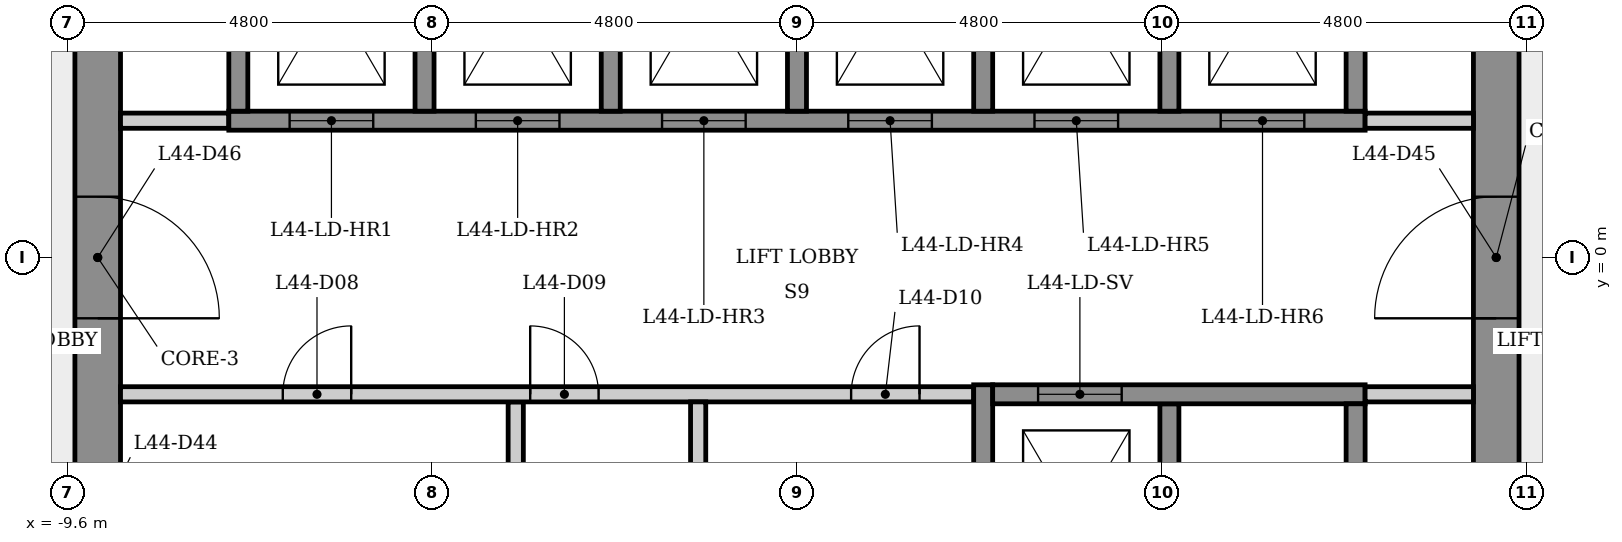
"""IFC4 building model, lengths in metres.
Left out: names, types, materials, properties, quantities, classifications, styles, units other than length and angle.
Written with IfcOpenShell. Run it as: python <this file> out.ifc"""

import sys

from ifc_helpers import new_model, si_unit, direction, frame, frame_2d, origin, place, context, subcontext, project, spatial, rectangle, extrude, element, fill, save


model = new_model("IFC4")
c1 = context("Model", 3, precision=1e-05, world=origin(), true_north=direction((0.0, 1.0)))
c2 = subcontext(c1, "Body", "Model", "MODEL_VIEW")
j1 = project(units=[si_unit("LENGTHUNIT", "METRE"), si_unit("PLANEANGLEUNIT", "RADIAN")], contexts=[c1])
p1 = place(None, origin())
s1 = spatial("IfcSite", under=j1, at=p1, CompositionType="ELEMENT")
p2 = place(p1, origin())
s2 = spatial("IfcBuilding", under=s1, at=p2, CompositionType="ELEMENT")
p3 = place(p2, frame((0.0, 0.0, 166.3)))
s3 = spatial("IfcBuildingStorey", under=s2, at=p3, CompositionType="ELEMENT", Elevation=166.3)
p4 = place(p3, frame((9.2, -5.485, 0.0), z_axis=(0.0, 0.0, 1.0), x_axis=(0.0, 1.0, 0.0)))
e1 = element("IfcWall", 1, at=p4, inside=s3, PredefinedType="SHEAR", context=c2, shape_type="SweptSolid", body=[
    extrude(rectangle(XDim=10.97, YDim=0.6, at=frame_2d((5.485, 0.0))), origin(), (0.0, 0.0, 1.0), 3.4),
])
p5 = place(p4, frame((4.685, 0.0, 0.0)))
e2 = element("IfcOpeningElement", 2, at=p5, cuts=e1, PredefinedType="OPENING", context=c2, shape_type="SweptSolid", body=[
    extrude(rectangle(XDim=1.6, YDim=2.1, at=frame_2d((0.8, 1.05))), frame((0.0, 0.31, 0.0), z_axis=(0.0, -1.0, 0.0), x_axis=(1.0, 0.0, 0.0)), (0.0, 0.0, 1.0), 0.62),
])
p6 = place(p3, frame((-9.2, 5.485, 0.0), z_axis=(0.0, 0.0, 1.0), x_axis=(0.0, -1.0, 0.0)))
e3 = element("IfcWall", 3, at=p6, inside=s3, PredefinedType="SHEAR", context=c2, shape_type="SweptSolid", body=[
    extrude(rectangle(XDim=10.97, YDim=0.6, at=frame_2d((5.485, 0.0))), origin(), (0.0, 0.0, 1.0), 3.4),
])
p7 = place(p6, frame((8.516, 0.0, 0.0)))
e4 = element("IfcOpeningElement", 4, at=p7, cuts=e3, PredefinedType="OPENING", context=c2, shape_type="SweptSolid", body=[
    extrude(rectangle(XDim=0.9, YDim=2.1, at=frame_2d((0.45, 1.05))), frame((0.0, 0.31, 0.0), z_axis=(0.0, -1.0, 0.0), x_axis=(1.0, 0.0, 0.0)), (0.0, 0.0, 1.0), 0.62),
])
p8 = place(p6, frame((4.685, 0.0, 0.0)))
e5 = element("IfcOpeningElement", 5, at=p8, cuts=e3, PredefinedType="OPENING", context=c2, shape_type="SweptSolid", body=[
    extrude(rectangle(XDim=1.6, YDim=2.1, at=frame_2d((0.8, 1.05))), frame((0.0, 0.31, 0.0), z_axis=(0.0, -1.0, 0.0), x_axis=(1.0, 0.0, 0.0)), (0.0, 0.0, 1.0), 0.62),
])
p9 = place(p3, frame((-8.9, 1.8, 0.0), z_axis=(0.0, 0.0, 1.0), x_axis=(1.0, 0.0, 0.0)))
e6 = element("IfcWall", 6, at=p9, inside=s3, PredefinedType="PARTITIONING", context=c2, shape_type="SweptSolid", body=[
    extrude(rectangle(XDim=1.425, YDim=0.2, at=frame_2d((0.712, 0.0))), origin(), (0.0, 0.0, 1.0), 3.05),
])
p10 = place(p3, frame((-7.475, 1.8, 0.0), z_axis=(0.0, 0.0, 1.0), x_axis=(1.0, 0.0, 0.0)))
e7 = element("IfcWall", 7, at=p10, inside=s3, PredefinedType="SHEAR", context=c2, shape_type="SweptSolid", body=[
    extrude(rectangle(XDim=14.95, YDim=0.25, at=frame_2d((7.475, 0.0))), origin(), (0.0, 0.0, 1.0), 3.05),
])
p11 = place(p10, frame((0.8, 0.0, 0.0)))
e8 = element("IfcOpeningElement", 8, at=p11, cuts=e7, PredefinedType="OPENING", context=c2, shape_type="SweptSolid", body=[
    extrude(rectangle(XDim=1.1, YDim=2.1, at=frame_2d((0.55, 1.05))), frame((0.0, 0.135, 0.0), z_axis=(0.0, -1.0, 0.0), x_axis=(1.0, 0.0, 0.0)), (0.0, 0.0, 1.0), 0.27),
])
p12 = place(p10, frame((3.25, 0.0, 0.0)))
e9 = element("IfcOpeningElement", 9, at=p12, cuts=e7, PredefinedType="OPENING", context=c2, shape_type="SweptSolid", body=[
    extrude(rectangle(XDim=1.1, YDim=2.1, at=frame_2d((0.55, 1.05))), frame((0.0, 0.135, 0.0), z_axis=(0.0, -1.0, 0.0), x_axis=(1.0, 0.0, 0.0)), (0.0, 0.0, 1.0), 0.27),
])
p13 = place(p10, frame((5.7, 0.0, 0.0)))
e10 = element("IfcOpeningElement", 10, at=p13, cuts=e7, PredefinedType="OPENING", context=c2, shape_type="SweptSolid", body=[
    extrude(rectangle(XDim=1.1, YDim=2.1, at=frame_2d((0.55, 1.05))), frame((0.0, 0.135, 0.0), z_axis=(0.0, -1.0, 0.0), x_axis=(1.0, 0.0, 0.0)), (0.0, 0.0, 1.0), 0.27),
])
p14 = place(p10, frame((8.15, 0.0, 0.0)))
e11 = element("IfcOpeningElement", 11, at=p14, cuts=e7, PredefinedType="OPENING", context=c2, shape_type="SweptSolid", body=[
    extrude(rectangle(XDim=1.1, YDim=2.1, at=frame_2d((0.55, 1.05))), frame((0.0, 0.135, 0.0), z_axis=(0.0, -1.0, 0.0), x_axis=(1.0, 0.0, 0.0)), (0.0, 0.0, 1.0), 0.27),
])
p15 = place(p10, frame((10.6, 0.0, 0.0)))
e12 = element("IfcOpeningElement", 12, at=p15, cuts=e7, PredefinedType="OPENING", context=c2, shape_type="SweptSolid", body=[
    extrude(rectangle(XDim=1.1, YDim=2.1, at=frame_2d((0.55, 1.05))), frame((0.0, 0.135, 0.0), z_axis=(0.0, -1.0, 0.0), x_axis=(1.0, 0.0, 0.0)), (0.0, 0.0, 1.0), 0.27),
])
p16 = place(p10, frame((13.05, 0.0, 0.0)))
e13 = element("IfcOpeningElement", 13, at=p16, cuts=e7, PredefinedType="OPENING", context=c2, shape_type="SweptSolid", body=[
    extrude(rectangle(XDim=1.1, YDim=2.1, at=frame_2d((0.55, 1.05))), frame((0.0, 0.135, 0.0), z_axis=(0.0, -1.0, 0.0), x_axis=(1.0, 0.0, 0.0)), (0.0, 0.0, 1.0), 0.27),
])
p17 = place(p3, frame((-7.35, 1.925, 0.0), z_axis=(0.0, 0.0, 1.0), x_axis=(0.0, 1.0, 0.0)))
e14 = element("IfcWall", 14, at=p17, inside=s3, PredefinedType="SHEAR", context=c2, shape_type="SweptSolid", body=[
    extrude(rectangle(XDim=4.036, YDim=0.25, at=frame_2d((2.018, 0.0))), origin(), (0.0, 0.0, 1.0), 3.05),
])
p18 = place(p3, frame((-4.9, 5.025, 0.0), z_axis=(0.0, 0.0, 1.0), x_axis=(0.0, -1.0, 0.0)))
e15 = element("IfcWall", 15, at=p18, inside=s3, PredefinedType="SHEAR", context=c2, shape_type="SweptSolid", body=[
    extrude(rectangle(XDim=3.1, YDim=0.25, at=frame_2d((1.55, 0.0))), origin(), (0.0, 0.0, 1.0), 3.4),
])
p19 = place(p3, frame((-3.7, -1.9, 0.0), z_axis=(0.0, 0.0, 1.0), x_axis=(0.0, -1.0, 0.0)))
e16 = element("IfcWall", 16, at=p19, inside=s3, PredefinedType="PARTITIONING", context=c2, shape_type="SweptSolid", body=[
    extrude(rectangle(XDim=3.15, YDim=0.2, at=frame_2d((1.575, 0.0))), origin(), (0.0, 0.0, 1.0), 3.05),
])
p20 = place(p3, frame((-8.9, -1.8, 0.0), z_axis=(0.0, 0.0, 1.0), x_axis=(1.0, 0.0, 0.0)))
e17 = element("IfcWall", 17, at=p20, inside=s3, PredefinedType="PARTITIONING", context=c2, shape_type="SweptSolid", body=[
    extrude(rectangle(XDim=11.225, YDim=0.2, at=frame_2d((5.613, 0.0))), origin(), (0.0, 0.0, 1.0), 3.05),
])
p21 = place(p20, frame((2.135, 0.0, 0.0)))
e18 = element("IfcOpeningElement", 18, at=p21, cuts=e17, PredefinedType="OPENING", context=c2, shape_type="SweptSolid", body=[
    extrude(rectangle(XDim=0.9, YDim=2.1, at=frame_2d((0.45, 1.05))), frame((0.0, 0.11, 0.0), z_axis=(0.0, -1.0, 0.0), x_axis=(1.0, 0.0, 0.0)), (0.0, 0.0, 1.0), 0.22),
])
p22 = place(p20, frame((5.39, 0.0, 0.0)))
e19 = element("IfcOpeningElement", 19, at=p22, cuts=e17, PredefinedType="OPENING", context=c2, shape_type="SweptSolid", body=[
    extrude(rectangle(XDim=0.9, YDim=2.1, at=frame_2d((0.45, 1.05))), frame((0.0, 0.11, 0.0), z_axis=(0.0, -1.0, 0.0), x_axis=(1.0, 0.0, 0.0)), (0.0, 0.0, 1.0), 0.22),
])
p23 = place(p20, frame((9.613, 0.0, 0.0)))
e20 = element("IfcOpeningElement", 20, at=p23, cuts=e17, PredefinedType="OPENING", context=c2, shape_type="SweptSolid", body=[
    extrude(rectangle(XDim=0.9, YDim=2.1, at=frame_2d((0.45, 1.05))), frame((0.0, 0.11, 0.0), z_axis=(0.0, -1.0, 0.0), x_axis=(1.0, 0.0, 0.0)), (0.0, 0.0, 1.0), 0.22),
])
p24 = place(p3, frame((-2.45, 5.025, 0.0), z_axis=(0.0, 0.0, 1.0), x_axis=(0.0, -1.0, 0.0)))
e21 = element("IfcWall", 21, at=p24, inside=s3, PredefinedType="SHEAR", context=c2, shape_type="SweptSolid", body=[
    extrude(rectangle(XDim=3.1, YDim=0.25, at=frame_2d((1.55, 0.0))), origin(), (0.0, 0.0, 1.0), 3.4),
])
p25 = place(p3, frame((-1.3, -1.9, 0.0), z_axis=(0.0, 0.0, 1.0), x_axis=(0.0, -1.0, 0.0)))
e22 = element("IfcWall", 22, at=p25, inside=s3, PredefinedType="PARTITIONING", context=c2, shape_type="SweptSolid", body=[
    extrude(rectangle(XDim=3.15, YDim=0.2, at=frame_2d((1.575, 0.0))), origin(), (0.0, 0.0, 1.0), 3.05),
])
p26 = place(p3, frame((0.0, 5.025, 0.0), z_axis=(0.0, 0.0, 1.0), x_axis=(0.0, -1.0, 0.0)))
e23 = element("IfcWall", 23, at=p26, inside=s3, PredefinedType="SHEAR", context=c2, shape_type="SweptSolid", body=[
    extrude(rectangle(XDim=3.1, YDim=0.25, at=frame_2d((1.55, 0.0))), origin(), (0.0, 0.0, 1.0), 3.4),
])
p27 = place(p3, frame((2.45, -5.275, 0.0), z_axis=(0.0, 0.0, 1.0), x_axis=(0.0, 1.0, 0.0)))
e24 = element("IfcWall", 24, at=p27, inside=s3, PredefinedType="SHEAR", context=c2, shape_type="SweptSolid", body=[
    extrude(rectangle(XDim=3.6, YDim=0.25, at=frame_2d((1.8, 0.0))), origin(), (0.0, 0.0, 1.0), 3.05),
])
for number, where, z_axis, x_axis in (
    (25, (2.45, 5.025, 0.0), (0.0, 0.0, 1.0), (0.0, -1.0, 0.0)),
    (26, (4.9, -1.925, 0.0), (0.0, 0.0, 1.0), (0.0, -1.0, 0.0)),
    (27, (4.9, 5.025, 0.0), (0.0, 0.0, 1.0), (0.0, -1.0, 0.0)),
):
    element("IfcWall", number, at=place(p3, frame(where, z_axis=z_axis, x_axis=x_axis)), inside=s3, PredefinedType="SHEAR", context=c2, shape_type="SweptSolid", body=[
        extrude(rectangle(XDim=3.1, YDim=0.25, at=frame_2d((1.55, 0.0))), origin(), (0.0, 0.0, 1.0), 3.4),
    ])
p28 = place(p3, frame((2.575, -1.8, 0.0), z_axis=(0.0, 0.0, 1.0), x_axis=(1.0, 0.0, 0.0)))
e28 = element("IfcWall", 28, at=p28, inside=s3, PredefinedType="SHEAR", context=c2, shape_type="SweptSolid", body=[
    extrude(rectangle(XDim=4.9, YDim=0.25, at=frame_2d((2.45, 0.0))), origin(), (0.0, 0.0, 1.0), 3.05),
])
p29 = place(p28, frame((0.597, 0.0, 0.0)))
e29 = element("IfcOpeningElement", 29, at=p29, cuts=e28, PredefinedType="OPENING", context=c2, shape_type="SweptSolid", body=[
    extrude(rectangle(XDim=1.1, YDim=2.1, at=frame_2d((0.55, 1.05))), frame((0.0, 0.135, 0.0), z_axis=(0.0, -1.0, 0.0), x_axis=(1.0, 0.0, 0.0)), (0.0, 0.0, 1.0), 0.27),
])
p30 = place(p3, frame((7.475, 1.8, 0.0), z_axis=(0.0, 0.0, 1.0), x_axis=(1.0, 0.0, 0.0)))
e30 = element("IfcWall", 30, at=p30, inside=s3, PredefinedType="PARTITIONING", context=c2, shape_type="SweptSolid", body=[
    extrude(rectangle(XDim=1.425, YDim=0.2, at=frame_2d((0.712, 0.0))), origin(), (0.0, 0.0, 1.0), 3.05),
])
for number, where, z_axis, x_axis in (
    (31, (7.35, -1.925, 0.0), (0.0, 0.0, 1.0), (0.0, -1.0, 0.0)),
    (32, (7.35, 5.025, 0.0), (0.0, 0.0, 1.0), (0.0, -1.0, 0.0)),
):
    element("IfcWall", number, at=place(p3, frame(where, z_axis=z_axis, x_axis=x_axis)), inside=s3, PredefinedType="SHEAR", context=c2, shape_type="SweptSolid", body=[
        extrude(rectangle(XDim=3.1, YDim=0.25, at=frame_2d((1.55, 0.0))), origin(), (0.0, 0.0, 1.0), 3.4),
    ])
p31 = place(p3, frame((8.9, -1.8, 0.0), z_axis=(0.0, 0.0, 1.0), x_axis=(-1.0, 0.0, 0.0)))
e33 = element("IfcWall", 33, at=p31, inside=s3, PredefinedType="PARTITIONING", context=c2, shape_type="SweptSolid", body=[
    extrude(rectangle(XDim=1.425, YDim=0.2, at=frame_2d((0.712, 0.0))), origin(), (0.0, 0.0, 1.0), 3.05),
])
p32 = place(p11, origin())
e34 = element("IfcDoor", 34, at=p32, inside=s3, OperationType="SLIDING_TO_LEFT", PredefinedType="DOOR", context=c2, shape_type="SweptSolid", body=[
    extrude(rectangle(XDim=1.1, YDim=2.1, at=frame_2d((0.55, 1.05))), frame((0.0, 0.025, 0.0), z_axis=(0.0, -1.0, 0.0), x_axis=(1.0, 0.0, 0.0)), (0.0, 0.0, 1.0), 0.05),
])
fill(e8, e34)
p33 = place(p12, origin())
e35 = element("IfcDoor", 35, at=p33, inside=s3, OperationType="SLIDING_TO_LEFT", PredefinedType="DOOR", context=c2, shape_type="SweptSolid", body=[
    extrude(rectangle(XDim=1.1, YDim=2.1, at=frame_2d((0.55, 1.05))), frame((0.0, 0.025, 0.0), z_axis=(0.0, -1.0, 0.0), x_axis=(1.0, 0.0, 0.0)), (0.0, 0.0, 1.0), 0.05),
])
fill(e9, e35)
p34 = place(p13, origin())
e36 = element("IfcDoor", 36, at=p34, inside=s3, OperationType="SLIDING_TO_LEFT", PredefinedType="DOOR", context=c2, shape_type="SweptSolid", body=[
    extrude(rectangle(XDim=1.1, YDim=2.1, at=frame_2d((0.55, 1.05))), frame((0.0, 0.025, 0.0), z_axis=(0.0, -1.0, 0.0), x_axis=(1.0, 0.0, 0.0)), (0.0, 0.0, 1.0), 0.05),
])
fill(e10, e36)
p35 = place(p14, origin())
e37 = element("IfcDoor", 37, at=p35, inside=s3, OperationType="SLIDING_TO_LEFT", PredefinedType="DOOR", context=c2, shape_type="SweptSolid", body=[
    extrude(rectangle(XDim=1.1, YDim=2.1, at=frame_2d((0.55, 1.05))), frame((0.0, 0.025, 0.0), z_axis=(0.0, -1.0, 0.0), x_axis=(1.0, 0.0, 0.0)), (0.0, 0.0, 1.0), 0.05),
])
fill(e11, e37)
p36 = place(p15, origin())
e38 = element("IfcDoor", 38, at=p36, inside=s3, OperationType="SLIDING_TO_LEFT", PredefinedType="DOOR", context=c2, shape_type="SweptSolid", body=[
    extrude(rectangle(XDim=1.1, YDim=2.1, at=frame_2d((0.55, 1.05))), frame((0.0, 0.025, 0.0), z_axis=(0.0, -1.0, 0.0), x_axis=(1.0, 0.0, 0.0)), (0.0, 0.0, 1.0), 0.05),
])
fill(e12, e38)
p37 = place(p16, origin())
e39 = element("IfcDoor", 39, at=p37, inside=s3, OperationType="SLIDING_TO_LEFT", PredefinedType="DOOR", context=c2, shape_type="SweptSolid", body=[
    extrude(rectangle(XDim=1.1, YDim=2.1, at=frame_2d((0.55, 1.05))), frame((0.0, 0.025, 0.0), z_axis=(0.0, -1.0, 0.0), x_axis=(1.0, 0.0, 0.0)), (0.0, 0.0, 1.0), 0.05),
])
fill(e13, e39)
p38 = place(p29, origin())
e40 = element("IfcDoor", 40, at=p38, inside=s3, OperationType="SLIDING_TO_LEFT", PredefinedType="DOOR", context=c2, shape_type="SweptSolid", body=[
    extrude(rectangle(XDim=1.1, YDim=2.1, at=frame_2d((0.55, 1.05))), frame((0.0, 0.025, 0.0), z_axis=(0.0, -1.0, 0.0), x_axis=(1.0, 0.0, 0.0)), (0.0, 0.0, 1.0), 0.05),
])
fill(e29, e40)
p39 = place(p21, origin())
e41 = element("IfcDoor", 41, at=p39, inside=s3, OperationType="SINGLE_SWING_RIGHT", PredefinedType="DOOR", context=c2, shape_type="SweptSolid", body=[
    extrude(rectangle(XDim=0.9, YDim=2.1, at=frame_2d((0.45, 1.05))), frame((0.0, 0.025, 0.0), z_axis=(0.0, -1.0, 0.0), x_axis=(1.0, 0.0, 0.0)), (0.0, 0.0, 1.0), 0.05),
])
fill(e18, e41)
p40 = place(p22, origin())
e42 = element("IfcDoor", 42, at=p40, inside=s3, OperationType="SINGLE_SWING_LEFT", PredefinedType="DOOR", context=c2, shape_type="SweptSolid", body=[
    extrude(rectangle(XDim=0.9, YDim=2.1, at=frame_2d((0.45, 1.05))), frame((0.0, 0.025, 0.0), z_axis=(0.0, -1.0, 0.0), x_axis=(1.0, 0.0, 0.0)), (0.0, 0.0, 1.0), 0.05),
])
fill(e19, e42)
p41 = place(p23, origin())
e43 = element("IfcDoor", 43, at=p41, inside=s3, OperationType="SINGLE_SWING_RIGHT", PredefinedType="DOOR", context=c2, shape_type="SweptSolid", body=[
    extrude(rectangle(XDim=0.9, YDim=2.1, at=frame_2d((0.45, 1.05))), frame((0.0, 0.025, 0.0), z_axis=(0.0, -1.0, 0.0), x_axis=(1.0, 0.0, 0.0)), (0.0, 0.0, 1.0), 0.05),
])
fill(e20, e43)
p42 = place(p5, origin())
e44 = element("IfcDoor", 44, at=p42, inside=s3, OperationType="SINGLE_SWING_LEFT", PredefinedType="DOOR", context=c2, shape_type="SweptSolid", body=[
    extrude(rectangle(XDim=1.6, YDim=2.1, at=frame_2d((0.8, 1.05))), frame((0.0, 0.025, 0.0), z_axis=(0.0, -1.0, 0.0), x_axis=(1.0, 0.0, 0.0)), (0.0, 0.0, 1.0), 0.05),
])
fill(e2, e44)
p43 = place(p8, origin())
e45 = element("IfcDoor", 45, at=p43, inside=s3, OperationType="SINGLE_SWING_RIGHT", PredefinedType="DOOR", context=c2, shape_type="SweptSolid", body=[
    extrude(rectangle(XDim=1.6, YDim=2.1, at=frame_2d((0.8, 1.05))), frame((0.0, 0.025, 0.0), z_axis=(0.0, -1.0, 0.0), x_axis=(1.0, 0.0, 0.0)), (0.0, 0.0, 1.0), 0.05),
])
fill(e5, e45)
save(model, sys.argv[1])
